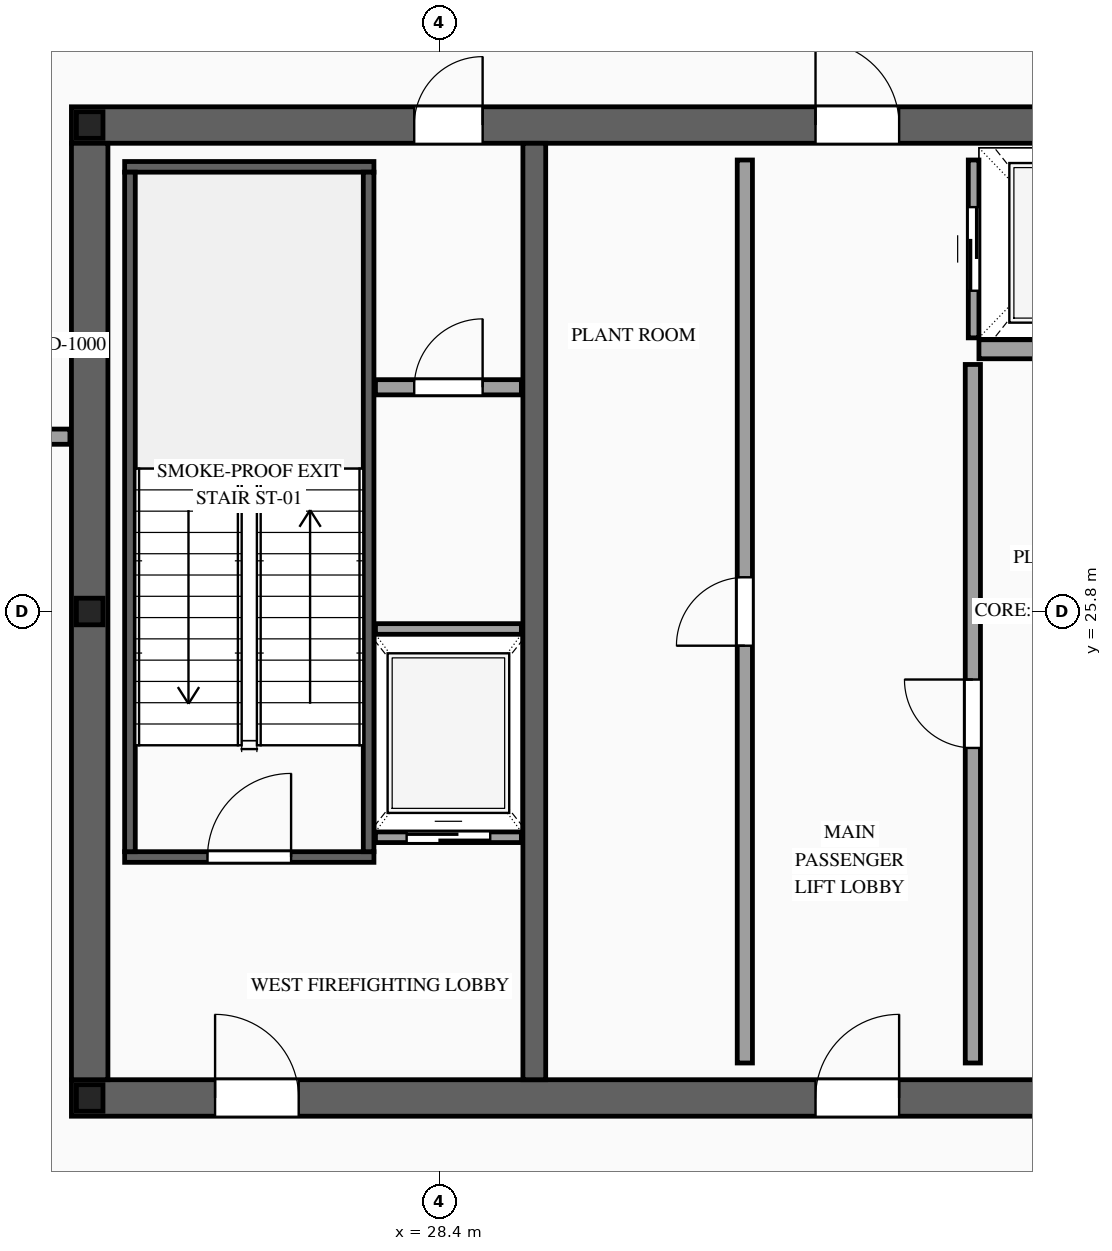
"""IFC4 building model, lengths in metres.
Left out: names, types, materials, properties, quantities, classifications, styles, units other than length and angle.
Written with IfcOpenShell. Run it as: python <this file> out.ifc"""

import sys

from ifc_helpers import new_model, si_unit, direction, frame, frame_2d, origin, origin_2d, place, context, subcontext, project, spatial, rectangle, i_section, extrude, source, transform, mapped, element, fill, save


model = new_model("IFC4")
c1 = context("Model", 3, precision=1e-05, world=origin(), true_north=direction((0.0, 1.0)))
c2 = subcontext(c1, "Body", "Model", "MODEL_VIEW")
j1 = project(units=[si_unit("LENGTHUNIT", "METRE"), si_unit("PLANEANGLEUNIT", "RADIAN")], contexts=[c1])
p1 = place(None, origin())
s1 = spatial("IfcSite", under=j1, at=p1, CompositionType="ELEMENT")
p2 = place(p1, origin())
s2 = spatial("IfcBuilding", under=s1, at=p2, CompositionType="ELEMENT")
p3 = place(p2, frame((0.0, 0.0, 306.6)))
s3 = spatial("IfcBuildingStorey", under=s2, at=p3, CompositionType="ELEMENT", Elevation=306.6)
p4 = place(p3, frame((23.56, 19.4, 0.0), z_axis=(0.0, 0.0, 1.0), x_axis=(1.0, 0.0, 0.0)))
e1 = element("IfcWall", 1, at=p4, inside=s3, PredefinedType="SHEAR", context=c2, shape_type="SweptSolid", body=[
    extrude(rectangle(XDim=26.88, YDim=0.48, at=frame_2d((13.44, 0.0))), origin(), (0.0, 0.0, 1.0), 4.6),
])
p5 = place(p4, frame((1.89, 0.0, 0.0)))
e2 = element("IfcOpeningElement", 2, at=p5, cuts=e1, PredefinedType="OPENING", context=c2, shape_type="SweptSolid", body=[
    extrude(rectangle(XDim=1.1, YDim=2.2, at=frame_2d((0.55, 1.1))), frame((0.0, 0.255, 0.0), z_axis=(0.0, -1.0, 0.0), x_axis=(1.0, 0.0, 0.0)), (0.0, 0.0, 1.0), 0.51),
])
p6 = place(p4, frame((9.79, 0.0, 0.0)))
e3 = element("IfcOpeningElement", 3, at=p6, cuts=e1, PredefinedType="OPENING", context=c2, shape_type="SweptSolid", body=[
    extrude(rectangle(XDim=1.1, YDim=2.2, at=frame_2d((0.55, 1.1))), frame((0.0, 0.255, 0.0), z_axis=(0.0, -1.0, 0.0), x_axis=(1.0, 0.0, 0.0)), (0.0, 0.0, 1.0), 0.51),
])
p7 = place(p4, frame((22.99, 0.0, 0.0)))
e4 = element("IfcOpeningElement", 4, at=p7, cuts=e1, PredefinedType="OPENING", context=c2, shape_type="SweptSolid", body=[
    extrude(rectangle(XDim=1.1, YDim=2.2, at=frame_2d((0.55, 1.1))), frame((0.0, 0.255, 0.0), z_axis=(0.0, -1.0, 0.0), x_axis=(1.0, 0.0, 0.0)), (0.0, 0.0, 1.0), 0.51),
])
p8 = place(p4, frame((19.61, 0.0, 0.0)))
e5 = element("IfcOpeningElement", 5, at=p8, cuts=e1, PredefinedType="OPENING", context=c2, shape_type="SweptSolid", body=[
    extrude(rectangle(XDim=0.9, YDim=2.15, at=frame_2d((0.45, 1.075))), frame((0.0, 0.255, 0.0), z_axis=(0.0, -1.0, 0.0), x_axis=(1.0, 0.0, 0.0)), (0.0, 0.0, 1.0), 0.51),
])
p9 = place(p3, frame((23.56, 32.2, 0.0), z_axis=(0.0, 0.0, 1.0), x_axis=(1.0, 0.0, 0.0)))
e6 = element("IfcWall", 6, at=p9, inside=s3, PredefinedType="SHEAR", context=c2, shape_type="SweptSolid", body=[
    extrude(rectangle(XDim=26.88, YDim=0.48, at=frame_2d((13.44, 0.0))), origin(), (0.0, 0.0, 1.0), 4.6),
])
p10 = place(p9, frame((4.51, 0.0, 0.0)))
e7 = element("IfcOpeningElement", 7, at=p10, cuts=e6, PredefinedType="OPENING", context=c2, shape_type="SweptSolid", body=[
    extrude(rectangle(XDim=0.9, YDim=2.15, at=frame_2d((0.45, 1.075))), frame((0.0, 0.255, 0.0), z_axis=(0.0, -1.0, 0.0), x_axis=(1.0, 0.0, 0.0)), (0.0, 0.0, 1.0), 0.51),
])
p11 = place(p9, frame((9.79, 0.0, 0.0)))
e8 = element("IfcOpeningElement", 8, at=p11, cuts=e6, PredefinedType="OPENING", context=c2, shape_type="SweptSolid", body=[
    extrude(rectangle(XDim=1.1, YDim=2.2, at=frame_2d((0.55, 1.1))), frame((0.0, 0.255, 0.0), z_axis=(0.0, -1.0, 0.0), x_axis=(1.0, 0.0, 0.0)), (0.0, 0.0, 1.0), 0.51),
])
p12 = place(p9, frame((15.64, 0.0, 0.0)))
e9 = element("IfcOpeningElement", 9, at=p12, cuts=e6, PredefinedType="OPENING", context=c2, shape_type="SweptSolid", body=[
    extrude(rectangle(XDim=1.1, YDim=2.2, at=frame_2d((0.55, 1.1))), frame((0.0, 0.255, 0.0), z_axis=(0.0, -1.0, 0.0), x_axis=(1.0, 0.0, 0.0)), (0.0, 0.0, 1.0), 0.51),
])
p13 = place(p9, frame((18.74, 0.0, 0.0)))
e10 = element("IfcOpeningElement", 10, at=p13, cuts=e6, PredefinedType="OPENING", context=c2, shape_type="SweptSolid", body=[
    extrude(rectangle(XDim=1.1, YDim=2.2, at=frame_2d((0.55, 1.1))), frame((0.0, 0.255, 0.0), z_axis=(0.0, -1.0, 0.0), x_axis=(1.0, 0.0, 0.0)), (0.0, 0.0, 1.0), 0.51),
])
m1 = source(origin(), c2, "Body", "SweptSolid", [
    extrude(rectangle(XDim=12.32, YDim=0.48, at=frame_2d((6.16, 0.0))), origin(), (0.0, 0.0, 1.0), 4.6),
])
p14 = place(p3, frame((23.8, 19.64, 0.0), z_axis=(0.0, 0.0, 1.0), x_axis=(0.0, 1.0, 0.0)))
e11 = element("IfcWall", 11, at=p14, inside=s3, PredefinedType="SHEAR", context=c2, shape_type="MappedRepresentation", body=[
    mapped(m1, transform((0.0, 0.0, 0.0), scale=1.0)),
])
m2 = source(origin(), c2, "Body", "SweptSolid", [
    extrude(rectangle(XDim=12.32, YDim=0.3, at=frame_2d((6.16, 0.0))), origin(), (0.0, 0.0, 1.0), 4.6),
])
p15 = place(p3, frame((29.65, 19.64, 0.0), z_axis=(0.0, 0.0, 1.0), x_axis=(0.0, 1.0, 0.0)))
e12 = element("IfcWall", 12, at=p15, inside=s3, PredefinedType="SOLIDWALL", context=c2, shape_type="MappedRepresentation", body=[
    mapped(m2, transform((0.0, 0.0, 0.0), scale=1.0)),
])
m3 = source(origin(), c2, "Body", "SweptSolid", [
    extrude(i_section(OverallWidth=0.35, OverallDepth=0.35, WebThickness=0.012, FlangeThickness=0.019, at=origin_2d()), origin(), (0.0, 0.0, 1.0), 4.6),
])
for number, where, z_axis, x_axis in (
    (13, (23.8, 19.4, 0.0), (0.0, 0.0, 1.0), (1.0, 0.0, 0.0)),
    (14, (23.8, 25.8, 0.0), (0.0, 0.0, 1.0), (1.0, 0.0, 0.0)),
    (15, (23.8, 32.2, 0.0), (0.0, 0.0, 1.0), (1.0, 0.0, 0.0)),
):
    element("IfcColumn", number, at=place(p3, frame(where, z_axis=z_axis, x_axis=x_axis)), inside=s3, PredefinedType="COLUMN", context=c2, shape_type="MappedRepresentation", body=[
        mapped(m3, transform((0.0, 0.0, 0.0), scale=1.0)),
    ])
p16 = place(p3, frame((27.56, 22.83, 0.0), z_axis=(0.0, 0.0, 1.0), x_axis=(1.0, 0.0, 0.0)))
e16 = element("IfcWall", 16, at=p16, inside=s3, PredefinedType="SOLIDWALL", context=c2, shape_type="SweptSolid", body=[
    extrude(rectangle(XDim=1.92, YDim=0.14, at=frame_2d((0.96, 0.0))), origin(), (0.0, 0.0, 1.0), 4.38),
])
p17 = place(p16, frame((0.41, 0.0, 0.0)))
e17 = element("IfcOpeningElement", 17, at=p17, cuts=e16, PredefinedType="OPENING", context=c2, shape_type="SweptSolid", body=[
    extrude(rectangle(XDim=1.1, YDim=2.2, at=frame_2d((0.55, 1.1))), frame((0.0, 0.085, 0.0), z_axis=(0.0, -1.0, 0.0), x_axis=(1.0, 0.0, 0.0)), (0.0, 0.0, 1.0), 0.17),
])
m4 = source(origin(), c2, "Body", "SweptSolid", [
    extrude(rectangle(XDim=1.92, YDim=0.14, at=frame_2d((0.96, 0.0))), origin(), (0.0, 0.0, 1.0), 4.38),
])
p18 = place(p3, frame((27.56, 25.57, 0.0), z_axis=(0.0, 0.0, 1.0), x_axis=(1.0, 0.0, 0.0)))
e18 = element("IfcWall", 18, at=p18, inside=s3, PredefinedType="SOLIDWALL", context=c2, shape_type="MappedRepresentation", body=[
    mapped(m4, transform((0.0, 0.0, 0.0), scale=1.0)),
])
p19 = place(p3, frame((35.43, 29.4, 0.0), z_axis=(0.0, 0.0, 1.0), x_axis=(0.0, 1.0, 0.0)))
e19 = element("IfcWall", 19, at=p19, inside=s3, PredefinedType="SOLIDWALL", context=c2, shape_type="SweptSolid", body=[
    extrude(rectangle(XDim=2.34, YDim=0.14, at=frame_2d((1.17, 0.0))), origin(), (0.0, 0.0, 1.0), 4.38),
])
p20 = place(p19, frame((0.62, 0.0, 0.0)))
e20 = element("IfcOpeningElement", 20, at=p20, cuts=e19, PredefinedType="OPENING", context=c2, shape_type="SweptSolid", body=[
    extrude(rectangle(XDim=1.1, YDim=2.2, at=frame_2d((0.55, 1.1))), frame((0.0, 0.085, 0.0), z_axis=(0.0, -1.0, 0.0), x_axis=(1.0, 0.0, 0.0)), (0.0, 0.0, 1.0), 0.17),
])
m5 = source(origin(), c2, "Body", "SweptSolid", [
    extrude(rectangle(XDim=2.4, YDim=0.25, at=frame_2d((1.2, 0.0))), origin(), (0.0, 0.0, 1.0), 4.38),
])
p21 = place(p3, frame((35.5, 29.25, 0.0), z_axis=(0.0, 0.0, 1.0), x_axis=(1.0, 0.0, 0.0)))
e21 = element("IfcWall", 21, at=p21, inside=s3, PredefinedType="SOLIDWALL", context=c2, shape_type="MappedRepresentation", body=[
    mapped(m5, transform((0.0, 0.0, 0.0), scale=1.0)),
])
p22 = place(p3, frame((24.26, 22.57, 0.0), z_axis=(0.0, 0.0, 1.0), x_axis=(1.0, 0.0, 0.0)))
e22 = element("IfcWall", 22, at=p22, inside=s3, PredefinedType="SOLIDWALL", context=c2, shape_type="SweptSolid", body=[
    extrude(rectangle(XDim=3.28, YDim=0.14, at=frame_2d((1.64, 0.0))), origin(), (0.0, 0.0, 1.0), 4.38),
])
p23 = place(p22, frame((1.09, 0.0, 0.0)))
e23 = element("IfcOpeningElement", 23, at=p23, cuts=e22, PredefinedType="OPENING", context=c2, shape_type="SweptSolid", body=[
    extrude(rectangle(XDim=1.1, YDim=2.2, at=frame_2d((0.55, 1.1))), frame((0.0, 0.085, 0.0), z_axis=(0.0, -1.0, 0.0), x_axis=(1.0, 0.0, 0.0)), (0.0, 0.0, 1.0), 0.17),
])
m6 = source(origin(), c2, "Body", "SweptSolid", [
    extrude(rectangle(XDim=3.28, YDim=0.14, at=frame_2d((1.64, 0.0))), origin(), (0.0, 0.0, 1.0), 4.38),
])
p24 = place(p3, frame((24.26, 31.65, 0.0), z_axis=(0.0, 0.0, 1.0), x_axis=(1.0, 0.0, 0.0)))
e24 = element("IfcWall", 24, at=p24, inside=s3, PredefinedType="SOLIDWALL", context=c2, shape_type="MappedRepresentation", body=[
    mapped(m6, transform((0.0, 0.0, 0.0), scale=1.0)),
])
m7 = source(origin(), c2, "Body", "SweptSolid", [
    extrude(rectangle(XDim=8.94, YDim=0.14, at=frame_2d((4.47, 0.0))), origin(), (0.0, 0.0, 1.0), 4.38),
])
for number, where, z_axis, x_axis in (
    (25, (24.33, 22.64, 0.0), (0.0, 0.0, 1.0), (0.0, 1.0, 0.0)),
    (26, (27.47, 22.64, 0.0), (0.0, 0.0, 1.0), (0.0, 1.0, 0.0)),
):
    element("IfcWall", number, at=place(p3, frame(where, z_axis=z_axis, x_axis=x_axis)), inside=s3, PredefinedType="SOLIDWALL", context=c2, shape_type="MappedRepresentation", body=[
        mapped(m7, transform((0.0, 0.0, 0.0), scale=1.0)),
    ])
p25 = place(p3, frame((27.56, 28.75, 0.0), z_axis=(0.0, 0.0, 1.0), x_axis=(1.0, 0.0, 0.0)))
e27 = element("IfcWall", 27, at=p25, inside=s3, PredefinedType="PARTITIONING", context=c2, shape_type="SweptSolid", body=[
    extrude(rectangle(XDim=1.92, YDim=0.2, at=frame_2d((0.96, 0.0))), origin(), (0.0, 0.0, 1.0), 4.38),
])
p26 = place(p25, frame((0.51, 0.0, 0.0)))
e28 = element("IfcOpeningElement", 28, at=p26, cuts=e27, PredefinedType="OPENING", context=c2, shape_type="SweptSolid", body=[
    extrude(rectangle(XDim=0.9, YDim=2.15, at=frame_2d((0.45, 1.075))), frame((0.0, 0.115, 0.0), z_axis=(0.0, -1.0, 0.0), x_axis=(1.0, 0.0, 0.0)), (0.0, 0.0, 1.0), 0.23),
])
p27 = place(p3, frame((32.42, 19.86, 0.0), z_axis=(0.0, 0.0, 1.0), x_axis=(0.0, 1.0, 0.0)))
e29 = element("IfcWall", 29, at=p27, inside=s3, PredefinedType="PARTITIONING", context=c2, shape_type="SweptSolid", body=[
    extrude(rectangle(XDim=11.88, YDim=0.2, at=frame_2d((5.94, 0.0))), origin(), (0.0, 0.0, 1.0), 4.38),
])
p28 = place(p27, frame((5.49, 0.0, 0.0)))
e30 = element("IfcOpeningElement", 30, at=p28, cuts=e29, PredefinedType="OPENING", context=c2, shape_type="SweptSolid", body=[
    extrude(rectangle(XDim=0.9, YDim=2.15, at=frame_2d((0.45, 1.075))), frame((0.0, 0.115, 0.0), z_axis=(0.0, -1.0, 0.0), x_axis=(1.0, 0.0, 0.0)), (0.0, 0.0, 1.0), 0.23),
])
p29 = place(p3, frame((35.42, 19.86, 0.0), z_axis=(0.0, 0.0, 1.0), x_axis=(0.0, 1.0, 0.0)))
e31 = element("IfcWall", 31, at=p29, inside=s3, PredefinedType="PARTITIONING", context=c2, shape_type="SweptSolid", body=[
    extrude(rectangle(XDim=9.19, YDim=0.2, at=frame_2d((4.595, 0.0))), origin(), (0.0, 0.0, 1.0), 4.38),
])
p30 = place(p29, frame((4.145, 0.0, 0.0)))
e32 = element("IfcOpeningElement", 32, at=p30, cuts=e31, PredefinedType="OPENING", context=c2, shape_type="SweptSolid", body=[
    extrude(rectangle(XDim=0.9, YDim=2.15, at=frame_2d((0.45, 1.075))), frame((0.0, 0.115, 0.0), z_axis=(0.0, -1.0, 0.0), x_axis=(1.0, 0.0, 0.0)), (0.0, 0.0, 1.0), 0.23),
])
m8 = source(origin(), c2, "Body", "SweptSolid", [
    extrude(rectangle(XDim=1.59, YDim=0.2, at=frame_2d((0.795, 0.0))), origin(), (0.0, 0.0, 1.0), 4.38),
])
p31 = place(p3, frame((21.95, 28.1, 0.0), z_axis=(0.0, 0.0, 1.0), x_axis=(1.0, 0.0, 0.0)))
e33 = element("IfcWall", 33, at=p31, inside=s3, PredefinedType="PARTITIONING", context=c2, shape_type="MappedRepresentation", body=[
    mapped(m8, transform((0.0, 0.0, 0.0), scale=1.0)),
])
m9 = source(origin(), c2, "Body", "SweptSolid", [
    extrude(rectangle(XDim=1.1, YDim=2.2, at=frame_2d((0.55, 1.1))), frame((0.0, 0.025, 0.0), z_axis=(0.0, -1.0, 0.0), x_axis=(1.0, 0.0, 0.0)), (0.0, 0.0, 1.0), 0.05),
])
p32 = place(p17, origin())
e34 = element("IfcDoor", 34, at=p32, inside=s3, OperationType="SLIDING_TO_LEFT", PredefinedType="DOOR", context=c2, shape_type="MappedRepresentation", body=[
    mapped(m9, transform((0.0, 0.0, 0.0), scale=1.0)),
])
fill(e17, e34)
p33 = place(p20, origin())
e35 = element("IfcDoor", 35, at=p33, inside=s3, OperationType="SLIDING_TO_RIGHT", PredefinedType="DOOR", context=c2, shape_type="MappedRepresentation", body=[
    mapped(m9, transform((0.0, 0.0, 0.0), scale=1.0)),
])
fill(e20, e35)
m10 = source(origin(), c2, "Body", "SweptSolid", [
    extrude(rectangle(XDim=1.1, YDim=2.2, at=frame_2d((0.55, 1.1))), frame((0.0, 0.025, 0.0), z_axis=(0.0, -1.0, 0.0), x_axis=(1.0, 0.0, 0.0)), (0.0, 0.0, 1.0), 0.05),
])
p34 = place(p23, origin())
e36 = element("IfcDoor", 36, at=p34, inside=s3, OperationType="SINGLE_SWING_RIGHT", PredefinedType="DOOR", context=c2, shape_type="MappedRepresentation", body=[
    mapped(m10, transform((0.0, 0.0, 0.0), scale=1.0)),
])
fill(e23, e36)
p35 = place(p5, origin())
e37 = element("IfcDoor", 37, at=p35, inside=s3, OperationType="SINGLE_SWING_LEFT", PredefinedType="DOOR", context=c2, shape_type="MappedRepresentation", body=[
    mapped(m10, transform((0.0, 0.0, 0.0), scale=1.0)),
])
fill(e2, e37)
p36 = place(p6, origin())
e38 = element("IfcDoor", 38, at=p36, inside=s3, OperationType="SINGLE_SWING_RIGHT", PredefinedType="DOOR", context=c2, shape_type="MappedRepresentation", body=[
    mapped(m10, transform((0.0, 0.0, 0.0), scale=1.0)),
])
fill(e3, e38)
m11 = source(origin(), c2, "Body", "SweptSolid", [
    extrude(rectangle(XDim=0.9, YDim=2.15, at=frame_2d((0.45, 1.075))), frame((0.0, 0.025, 0.0), z_axis=(0.0, -1.0, 0.0), x_axis=(1.0, 0.0, 0.0)), (0.0, 0.0, 1.0), 0.05),
])
p37 = place(p10, origin())
e39 = element("IfcDoor", 39, at=p37, inside=s3, OperationType="SINGLE_SWING_RIGHT", PredefinedType="DOOR", context=c2, shape_type="MappedRepresentation", body=[
    mapped(m11, transform((0.0, 0.0, 0.0), scale=1.0)),
])
fill(e7, e39)
p38 = place(p11, origin())
e40 = element("IfcDoor", 40, at=p38, inside=s3, OperationType="SINGLE_SWING_LEFT", PredefinedType="DOOR", context=c2, shape_type="MappedRepresentation", body=[
    mapped(m10, transform((0.0, 0.0, 0.0), scale=1.0)),
])
fill(e8, e40)
p39 = place(p26, origin())
e41 = element("IfcDoor", 41, at=p39, inside=s3, OperationType="SINGLE_SWING_RIGHT", PredefinedType="DOOR", context=c2, shape_type="MappedRepresentation", body=[
    mapped(m11, transform((0.0, 0.0, 0.0), scale=1.0)),
])
fill(e28, e41)
p40 = place(p28, origin())
e42 = element("IfcDoor", 42, at=p40, inside=s3, OperationType="SINGLE_SWING_LEFT", PredefinedType="DOOR", context=c2, shape_type="MappedRepresentation", body=[
    mapped(m11, transform((0.0, 0.0, 0.0), scale=1.0)),
])
fill(e30, e42)
p41 = place(p30, origin())
e43 = element("IfcDoor", 43, at=p41, inside=s3, OperationType="SINGLE_SWING_RIGHT", PredefinedType="DOOR", context=c2, shape_type="MappedRepresentation", body=[
    mapped(m11, transform((0.0, 0.0, 0.0), scale=1.0)),
])
fill(e32, e43)
save(model, sys.argv[1])
